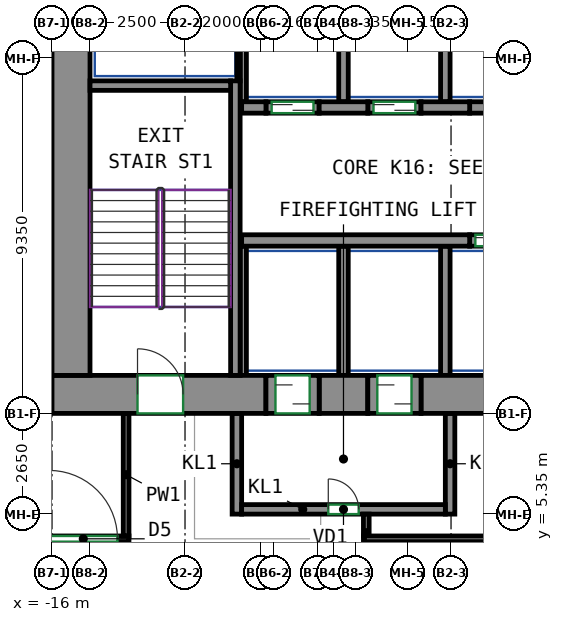
"""IFC4 building model, lengths in metres.
Left out: names, types, materials, properties, quantities, classifications, styles, units other than length and angle.
Written with IfcOpenShell. Run it as: python <this file> out.ifc"""

import sys

from ifc_helpers import new_model, si_unit, direction, frame, frame_2d, origin, place, context, subcontext, project, spatial, rectangle, extrude, source, transform, mapped, element, fill, save


model = new_model("IFC4")
c1 = context("Model", 3, precision=1e-05, world=origin(), true_north=direction((0.0, 1.0)))
c2 = subcontext(c1, "Body", "Model", "MODEL_VIEW")
j1 = project(units=[si_unit("LENGTHUNIT", "METRE"), si_unit("PLANEANGLEUNIT", "RADIAN")], contexts=[c1])
p1 = place(None, origin())
s1 = spatial("IfcSite", under=j1, at=p1, CompositionType="ELEMENT")
p2 = place(p1, origin())
s2 = spatial("IfcBuilding", under=s1, at=p2, CompositionType="ELEMENT")
p3 = place(p2, frame((0.0, 0.0, 67.2)))
s3 = spatial("IfcBuildingStorey", under=s2, at=p3, CompositionType="ELEMENT", Elevation=67.2)
m1 = source(origin(), c2, "Body", "SweptSolid", [
    extrude(rectangle(XDim=5.63, YDim=1.0, at=frame_2d((2.815, 0.0))), origin(), (0.0, 0.0, 1.0), 3.72),
])
p4 = place(p3, frame((-16.0, 8.5, 0.0), z_axis=(0.0, 0.0, 1.0), x_axis=(1.0, 0.0, 0.0)))
e1 = element("IfcWall", 1, at=p4, inside=s3, PredefinedType="SHEAR", context=c2, shape_type="MappedRepresentation", body=[
    mapped(m1, transform((0.0, 0.0, 0.0))),
])
p5 = place(p4, frame((2.25, 0.0, 0.0)))
e2 = element("IfcOpeningElement", 2, at=p5, cuts=e1, PredefinedType="OPENING", context=c2, shape_type="SweptSolid", body=[
    extrude(rectangle(XDim=1.2, YDim=2.1, at=frame_2d((0.6, 1.05))), frame((0.0, 0.51, 0.0), z_axis=(0.0, -1.0, 0.0), x_axis=(1.0, 0.0, 0.0)), (0.0, 0.0, 1.0), 1.02),
])
m2 = source(origin(), c2, "Body", "SweptSolid", [
    extrude(rectangle(XDim=1.28, YDim=1.0, at=frame_2d((0.64, 0.0))), origin(), (0.0, 0.0, 1.0), 3.72),
])
p6 = place(p3, frame((-8.97, 8.5, 0.0), z_axis=(0.0, 0.0, 1.0), x_axis=(1.0, 0.0, 0.0)))
e3 = element("IfcWall", 3, at=p6, inside=s3, PredefinedType="SHEAR", context=c2, shape_type="MappedRepresentation", body=[
    mapped(m2, transform((0.0, 0.0, 0.0))),
])
m3 = source(origin(), c2, "Body", "SweptSolid", [
    extrude(rectangle(XDim=14.18, YDim=1.0, at=frame_2d((7.09, 0.0))), origin(), (0.0, 0.0, 1.0), 3.72),
])
p7 = place(p3, frame((-6.29, 8.5, 0.0), z_axis=(0.0, 0.0, 1.0), x_axis=(1.0, 0.0, 0.0)))
e4 = element("IfcWall", 4, at=p7, inside=s3, PredefinedType="SHEAR", context=c2, shape_type="MappedRepresentation", body=[
    mapped(m3, transform((0.0, 0.0, 0.0))),
])
m4 = source(origin(), c2, "Body", "SweptSolid", [
    extrude(rectangle(XDim=12.0, YDim=1.0, at=frame_2d((6.0, 0.0))), origin(), (0.0, 0.0, 1.0), 3.72),
])
p8 = place(p3, frame((-15.5, 9.0, 0.0), z_axis=(0.0, 0.0, 1.0), x_axis=(0.0, 1.0, 0.0)))
e5 = element("IfcWall", 5, at=p8, inside=s3, PredefinedType="SHEAR", context=c2, shape_type="MappedRepresentation", body=[
    mapped(m4, transform((0.0, 0.0, 0.0))),
])
m5 = source(origin(), c2, "Body", "SweptSolid", [
    extrude(rectangle(XDim=7.75, YDim=0.25, at=frame_2d((3.875, 0.0))), origin(), (0.0, 0.0, 1.0), 3.72),
])
p9 = place(p3, frame((-11.175, 9.0, 0.0), z_axis=(0.0, 0.0, 1.0), x_axis=(0.0, 1.0, 0.0)))
e6 = element("IfcWall", 6, at=p9, inside=s3, PredefinedType="SHEAR", context=c2, shape_type="MappedRepresentation", body=[
    mapped(m5, transform((0.0, 0.0, 0.0))),
])
m6 = source(origin(), c2, "Body", "SweptSolid", [
    extrude(rectangle(XDim=3.7, YDim=0.25, at=frame_2d((1.85, 0.0))), origin(), (0.0, 0.0, 1.0), 3.72),
])
p10 = place(p3, frame((-15.0, 16.625, 0.0), z_axis=(0.0, 0.0, 1.0), x_axis=(1.0, 0.0, 0.0)))
e7 = element("IfcWall", 7, at=p10, inside=s3, PredefinedType="SHEAR", context=c2, shape_type="MappedRepresentation", body=[
    mapped(m6, transform((0.0, 0.0, 0.0))),
])
m7 = source(origin(), c2, "Body", "SweptSolid", [
    extrude(rectangle(XDim=6.0, YDim=0.3, at=frame_2d((3.0, 0.0))), origin(), (0.0, 0.0, 1.0), 3.72),
])
p11 = place(p3, frame((-11.01, 12.55, 0.0), z_axis=(0.0, 0.0, 1.0), x_axis=(1.0, 0.0, 0.0)))
e8 = element("IfcWall", 8, at=p11, inside=s3, PredefinedType="SHEAR", context=c2, shape_type="MappedRepresentation", body=[
    mapped(m7, transform((0.0, 0.0, 0.0))),
])
m8 = source(origin(), c2, "Body", "SweptSolid", [
    extrude(rectangle(XDim=0.64, YDim=0.3, at=frame_2d((0.32, 0.0))), origin(), (0.0, 0.0, 1.0), 3.72),
])
p12 = place(p3, frame((-11.01, 16.05, 0.0), z_axis=(0.0, 0.0, 1.0), x_axis=(1.0, 0.0, 0.0)))
e9 = element("IfcWall", 9, at=p12, inside=s3, PredefinedType="SHEAR", context=c2, shape_type="MappedRepresentation", body=[
    mapped(m8, transform((0.0, 0.0, 0.0))),
])
m9 = source(origin(), c2, "Body", "SweptSolid", [
    extrude(rectangle(XDim=1.28, YDim=0.3, at=frame_2d((0.64, 0.0))), origin(), (0.0, 0.0, 1.0), 3.72),
])
for number, where, z_axis, x_axis in (
    (10, (-8.97, 16.05, 0.0), (0.0, 0.0, 1.0), (1.0, 0.0, 0.0)),
    (11, (-6.29, 16.05, 0.0), (0.0, 0.0, 1.0), (1.0, 0.0, 0.0)),
):
    element("IfcWall", number, at=place(p3, frame(where, z_axis=z_axis, x_axis=x_axis)), inside=s3, PredefinedType="SHEAR", context=c2, shape_type="MappedRepresentation", body=[
        mapped(m9, transform((0.0, 0.0, 0.0))),
    ])
m10 = source(origin(), c2, "Body", "SweptSolid", [
    extrude(rectangle(XDim=1.4, YDim=0.3, at=frame_2d((0.7, 0.0))), origin(), (0.0, 0.0, 1.0), 3.72),
])
p13 = place(p3, frame((-5.01, 12.55, 0.0), z_axis=(0.0, 0.0, 1.0), x_axis=(1.0, 0.0, 0.0)))
e12 = element("IfcWall", 12, at=p13, inside=s3, PredefinedType="PARTITIONING", context=c2, shape_type="MappedRepresentation", body=[
    mapped(m10, transform((0.0, 0.0, 0.0))),
])
p14 = place(p13, frame((0.15, 0.0, 0.0)))
e13 = element("IfcOpeningElement", 13, at=p14, cuts=e12, PredefinedType="OPENING", context=c2, shape_type="SweptSolid", body=[
    extrude(rectangle(XDim=1.1, YDim=2.1, at=frame_2d((0.55, 1.05))), frame((0.0, 0.16, 0.0), z_axis=(0.0, -1.0, 0.0), x_axis=(1.0, 0.0, 0.0)), (0.0, 0.0, 1.0), 0.32),
])
m11 = source(origin(), c2, "Body", "SweptSolid", [
    extrude(rectangle(XDim=1.4, YDim=0.3, at=frame_2d((0.7, 0.0))), origin(), (0.0, 0.0, 1.0), 3.72),
])
p15 = place(p3, frame((-10.37, 16.05, 0.0), z_axis=(0.0, 0.0, 1.0), x_axis=(1.0, 0.0, 0.0)))
e14 = element("IfcWall", 14, at=p15, inside=s3, PredefinedType="PARTITIONING", context=c2, shape_type="MappedRepresentation", body=[
    mapped(m11, transform((0.0, 0.0, 0.0))),
])
p16 = place(p15, frame((0.15, 0.0, 0.0)))
e15 = element("IfcOpeningElement", 15, at=p16, cuts=e14, PredefinedType="OPENING", context=c2, shape_type="SweptSolid", body=[
    extrude(rectangle(XDim=1.1, YDim=2.1, at=frame_2d((0.55, 1.05))), frame((0.0, 0.16, 0.0), z_axis=(0.0, -1.0, 0.0), x_axis=(1.0, 0.0, 0.0)), (0.0, 0.0, 1.0), 0.32),
])
p17 = place(p3, frame((-7.69, 16.05, 0.0), z_axis=(0.0, 0.0, 1.0), x_axis=(1.0, 0.0, 0.0)))
e16 = element("IfcWall", 16, at=p17, inside=s3, PredefinedType="PARTITIONING", context=c2, shape_type="MappedRepresentation", body=[
    mapped(m10, transform((0.0, 0.0, 0.0))),
])
p18 = place(p17, frame((0.15, 0.0, 0.0)))
e17 = element("IfcOpeningElement", 17, at=p18, cuts=e16, PredefinedType="OPENING", context=c2, shape_type="SweptSolid", body=[
    extrude(rectangle(XDim=1.1, YDim=2.1, at=frame_2d((0.55, 1.05))), frame((0.0, 0.16, 0.0), z_axis=(0.0, -1.0, 0.0), x_axis=(1.0, 0.0, 0.0)), (0.0, 0.0, 1.0), 0.32),
])
p19 = place(p3, frame((-5.01, 16.05, 0.0), z_axis=(0.0, 0.0, 1.0), x_axis=(1.0, 0.0, 0.0)))
e18 = element("IfcWall", 18, at=p19, inside=s3, PredefinedType="PARTITIONING", context=c2, shape_type="MappedRepresentation", body=[
    mapped(m10, transform((0.0, 0.0, 0.0))),
])
m12 = source(origin(), c2, "Body", "SweptSolid", [
    extrude(rectangle(XDim=2.65, YDim=0.25, at=frame_2d((1.325, 0.0))), origin(), (0.0, 0.0, 1.0), 3.72),
])
for number, where, z_axis, x_axis in (
    (19, (-11.135, 5.35, 0.0), (0.0, 0.0, 1.0), (0.0, 1.0, 0.0)),
    (20, (-5.525, 5.35, 0.0), (0.0, 0.0, 1.0), (0.0, 1.0, 0.0)),
):
    element("IfcWall", number, at=place(p3, frame(where, z_axis=z_axis, x_axis=x_axis)), inside=s3, PredefinedType="PARTITIONING", context=c2, shape_type="MappedRepresentation", body=[
        mapped(m12, transform((0.0, 0.0, 0.0))),
    ])
m13 = source(origin(), c2, "Body", "SweptSolid", [
    extrude(rectangle(XDim=5.36, YDim=0.25, at=frame_2d((2.68, 0.0))), origin(), (0.0, 0.0, 1.0), 3.72),
])
p20 = place(p3, frame((-11.01, 5.475, 0.0), z_axis=(0.0, 0.0, 1.0), x_axis=(1.0, 0.0, 0.0)))
e21 = element("IfcWall", 21, at=p20, inside=s3, PredefinedType="PARTITIONING", context=c2, shape_type="MappedRepresentation", body=[
    mapped(m13, transform((0.0, 0.0, 0.0))),
])
p21 = place(p20, frame((2.28, 0.0, 0.0)))
e22 = element("IfcOpeningElement", 22, at=p21, cuts=e21, PredefinedType="OPENING", context=c2, shape_type="SweptSolid", body=[
    extrude(rectangle(XDim=0.8, YDim=2.0, at=frame_2d((0.4, 1.0))), frame((0.0, 0.135, 0.0), z_axis=(0.0, -1.0, 0.0), x_axis=(1.0, 0.0, 0.0)), (0.0, 0.0, 1.0), 0.27),
])
m14 = source(origin(), c2, "Body", "SweptSolid", [
    extrude(rectangle(XDim=3.275, YDim=0.165, at=frame_2d((1.638, 0.0))), origin(), (0.0, 0.0, 1.0), 3.72),
])
p22 = place(p3, frame((-10.968, 16.2, 0.0), z_axis=(0.0, 0.0, 1.0), x_axis=(0.0, 1.0, 0.0)))
e23 = element("IfcWall", 23, at=p22, inside=s3, PredefinedType="PARTITIONING", context=c2, shape_type="MappedRepresentation", body=[
    mapped(m14, transform((0.0, 0.0, 0.0))),
])
m15 = source(origin(), c2, "Body", "SweptSolid", [
    extrude(rectangle(XDim=2.725, YDim=0.085, at=frame_2d((1.363, 0.0))), origin(), (0.0, 0.0, 1.0), 3.72),
])
p23 = place(p3, frame((-11.093, 16.75, 0.0), z_axis=(0.0, 0.0, 1.0), x_axis=(0.0, 1.0, 0.0)))
e24 = element("IfcWall", 24, at=p23, inside=s3, PredefinedType="PARTITIONING", context=c2, shape_type="MappedRepresentation", body=[
    mapped(m15, transform((0.0, 0.0, 0.0))),
])
m16 = source(origin(), c2, "Body", "SweptSolid", [
    extrude(rectangle(XDim=3.275, YDim=0.25, at=frame_2d((1.638, 0.0))), origin(), (0.0, 0.0, 1.0), 3.72),
])
for number, where, z_axis, x_axis in (
    (25, (-5.65, 16.2, 0.0), (0.0, 0.0, 1.0), (0.0, 1.0, 0.0)),
    (26, (-8.33, 16.2, 0.0), (0.0, 0.0, 1.0), (0.0, 1.0, 0.0)),
):
    element("IfcWall", number, at=place(p3, frame(where, z_axis=z_axis, x_axis=x_axis)), inside=s3, PredefinedType="PARTITIONING", context=c2, shape_type="MappedRepresentation", body=[
        mapped(m16, transform((0.0, 0.0, 0.0))),
    ])
m17 = source(origin(), c2, "Body", "SweptSolid", [
    extrude(rectangle(XDim=3.4, YDim=0.165, at=frame_2d((1.7, 0.0))), origin(), (0.0, 0.0, 1.0), 3.72),
])
p24 = place(p3, frame((-10.968, 9.0, 0.0), z_axis=(0.0, 0.0, 1.0), x_axis=(0.0, 1.0, 0.0)))
e27 = element("IfcWall", 27, at=p24, inside=s3, PredefinedType="PARTITIONING", context=c2, shape_type="MappedRepresentation", body=[
    mapped(m17, transform((0.0, 0.0, 0.0))),
])
m18 = source(origin(), c2, "Body", "SweptSolid", [
    extrude(rectangle(XDim=3.4, YDim=0.25, at=frame_2d((1.7, 0.0))), origin(), (0.0, 0.0, 1.0), 3.72),
])
for number, where, z_axis, x_axis in (
    (28, (-5.65, 9.0, 0.0), (0.0, 0.0, 1.0), (0.0, 1.0, 0.0)),
    (29, (-8.33, 9.0, 0.0), (0.0, 0.0, 1.0), (0.0, 1.0, 0.0)),
):
    element("IfcWall", number, at=place(p3, frame(where, z_axis=z_axis, x_axis=x_axis)), inside=s3, PredefinedType="PARTITIONING", context=c2, shape_type="MappedRepresentation", body=[
        mapped(m18, transform((0.0, 0.0, 0.0))),
    ])
m19 = source(origin(), c2, "Body", "SweptSolid", [
    extrude(rectangle(XDim=1.4, YDim=1.0, at=frame_2d((0.7, 0.0))), origin(), (0.0, 0.0, 1.0), 2.7),
])
p25 = place(p3, frame((-10.37, 8.5, 0.0), z_axis=(0.0, 0.0, 1.0), x_axis=(1.0, 0.0, 0.0)))
e30 = element("IfcWall", 30, at=p25, inside=s3, PredefinedType="PARTITIONING", context=c2, shape_type="MappedRepresentation", body=[
    mapped(m19, transform((0.0, 0.0, 0.0))),
])
p26 = place(p25, frame((0.25, 0.0, 0.0)))
e31 = element("IfcOpeningElement", 31, at=p26, cuts=e30, PredefinedType="OPENING", context=c2, shape_type="SweptSolid", body=[
    extrude(rectangle(XDim=0.9, YDim=2.1, at=frame_2d((0.45, 1.05))), frame((0.0, 0.51, 0.0), z_axis=(0.0, -1.0, 0.0), x_axis=(1.0, 0.0, 0.0)), (0.0, 0.0, 1.0), 1.02),
])
m20 = source(origin(), c2, "Body", "SweptSolid", [
    extrude(rectangle(XDim=1.4, YDim=1.0, at=frame_2d((0.7, 0.0))), origin(), (0.0, 0.0, 1.0), 2.7),
])
p27 = place(p3, frame((-7.69, 8.5, 0.0), z_axis=(0.0, 0.0, 1.0), x_axis=(1.0, 0.0, 0.0)))
e32 = element("IfcWall", 32, at=p27, inside=s3, PredefinedType="PARTITIONING", context=c2, shape_type="MappedRepresentation", body=[
    mapped(m20, transform((0.0, 0.0, 0.0))),
])
p28 = place(p27, frame((0.25, 0.0, 0.0)))
e33 = element("IfcOpeningElement", 33, at=p28, cuts=e32, PredefinedType="OPENING", context=c2, shape_type="SweptSolid", body=[
    extrude(rectangle(XDim=0.9, YDim=2.1, at=frame_2d((0.45, 1.05))), frame((0.0, 0.51, 0.0), z_axis=(0.0, -1.0, 0.0), x_axis=(1.0, 0.0, 0.0)), (0.0, 0.0, 1.0), 1.02),
])
p29 = place(p3, frame((-19.325, 4.7, 0.0), z_axis=(0.0, 0.0, 1.0), x_axis=(1.0, 0.0, 0.0)))
e34 = element("IfcWall", 34, at=p29, inside=s3, PredefinedType="PARTITIONING", context=c2, shape_type="SweptSolid", body=[
    extrude(rectangle(XDim=5.35, YDim=0.15, at=frame_2d((2.675, 0.0))), origin(), (0.0, 0.0, 1.0), 3.72),
])
p30 = place(p29, frame((3.248, 0.0, 0.0)))
e35 = element("IfcOpeningElement", 35, at=p30, cuts=e34, PredefinedType="OPENING", context=c2, shape_type="SweptSolid", body=[
    extrude(rectangle(XDim=1.8, YDim=2.1, at=frame_2d((0.9, 1.05))), frame((0.0, 0.085, 0.0), z_axis=(0.0, -1.0, 0.0), x_axis=(1.0, 0.0, 0.0)), (0.0, 0.0, 1.0), 0.17),
])
p31 = place(p3, frame((-14.05, 8.0, 0.0), z_axis=(0.0, 0.0, 1.0), x_axis=(0.0, -1.0, 0.0)))
e36 = element("IfcWall", 36, at=p31, inside=s3, PredefinedType="PARTITIONING", context=c2, shape_type="SweptSolid", body=[
    extrude(rectangle(XDim=3.225, YDim=0.15, at=frame_2d((1.613, 0.0))), origin(), (0.0, 0.0, 1.0), 3.72),
])
p32 = place(p3, frame((-7.73, 4.775, 0.0), z_axis=(0.0, 0.0, 1.0), x_axis=(0.0, 1.0, 0.0)))
e37 = element("IfcWall", 37, at=p32, inside=s3, PredefinedType="PARTITIONING", context=c2, shape_type="SweptSolid", body=[
    extrude(rectangle(XDim=0.575, YDim=0.15, at=frame_2d((0.288, 0.0))), origin(), (0.0, 0.0, 1.0), 3.72),
])
p33 = place(p3, frame((-7.805, 4.7, 0.0), z_axis=(0.0, 0.0, 1.0), x_axis=(1.0, 0.0, 0.0)))
e38 = element("IfcWall", 38, at=p33, inside=s3, PredefinedType="PARTITIONING", context=c2, shape_type="SweptSolid", body=[
    extrude(rectangle(XDim=15.97, YDim=0.15, at=frame_2d((7.985, 0.0))), origin(), (0.0, 0.0, 1.0), 3.72),
])
p34 = place(p33, frame((6.43, 0.0, 0.0)))
e39 = element("IfcOpeningElement", 39, at=p34, cuts=e38, PredefinedType="OPENING", context=c2, shape_type="SweptSolid", body=[
    extrude(rectangle(XDim=1.0, YDim=2.1, at=frame_2d((0.5, 1.05))), frame((0.0, 0.085, 0.0), z_axis=(0.0, -1.0, 0.0), x_axis=(1.0, 0.0, 0.0)), (0.0, 0.0, 1.0), 0.17),
])
p35 = place(p21, origin())
e40 = element("IfcDoor", 40, at=p35, inside=s3, OperationType="SINGLE_SWING_LEFT", PredefinedType="DOOR", context=c2, shape_type="SweptSolid", body=[
    extrude(rectangle(XDim=0.8, YDim=2.0, at=frame_2d((0.4, 1.0))), frame((0.0, 0.025, 0.0), z_axis=(0.0, -1.0, 0.0), x_axis=(1.0, 0.0, 0.0)), (0.0, 0.0, 1.0), 0.05),
])
fill(e22, e40)
p36 = place(p26, origin())
e41 = element("IfcDoor", 41, at=p36, inside=s3, OperationType="SLIDING_TO_LEFT", PredefinedType="DOOR", context=c2, shape_type="SweptSolid", body=[
    extrude(rectangle(XDim=0.9, YDim=2.1, at=frame_2d((0.45, 1.05))), frame((0.0, 0.405, 0.0), z_axis=(0.0, -1.0, 0.0), x_axis=(1.0, 0.0, 0.0)), (0.0, 0.0, 1.0), 0.05),
])
fill(e31, e41)
p37 = place(p28, origin())
e42 = element("IfcDoor", 42, at=p37, inside=s3, OperationType="SLIDING_TO_RIGHT", PredefinedType="DOOR", context=c2, shape_type="SweptSolid", body=[
    extrude(rectangle(XDim=0.9, YDim=2.1, at=frame_2d((0.45, 1.05))), frame((0.0, 0.405, 0.0), z_axis=(0.0, -1.0, 0.0), x_axis=(1.0, 0.0, 0.0)), (0.0, 0.0, 1.0), 0.05),
])
fill(e33, e42)
p38 = place(p14, origin())
e43 = element("IfcDoor", 43, at=p38, inside=s3, OperationType="DOUBLE_DOOR_SLIDING", PredefinedType="DOOR", context=c2, shape_type="SweptSolid", body=[
    extrude(rectangle(XDim=1.1, YDim=2.1, at=frame_2d((0.55, 1.05))), frame((0.0, 0.025, 0.0), z_axis=(0.0, -1.0, 0.0), x_axis=(1.0, 0.0, 0.0)), (0.0, 0.0, 1.0), 0.05),
])
fill(e13, e43)
p39 = place(p16, origin())
e44 = element("IfcDoor", 44, at=p39, inside=s3, OperationType="DOUBLE_DOOR_SLIDING", PredefinedType="DOOR", context=c2, shape_type="SweptSolid", body=[
    extrude(rectangle(XDim=1.1, YDim=2.1, at=frame_2d((0.55, 1.05))), frame((0.0, 0.025, 0.0), z_axis=(0.0, -1.0, 0.0), x_axis=(1.0, 0.0, 0.0)), (0.0, 0.0, 1.0), 0.05),
])
fill(e15, e44)
p40 = place(p18, origin())
e45 = element("IfcDoor", 45, at=p40, inside=s3, OperationType="DOUBLE_DOOR_SLIDING", PredefinedType="DOOR", context=c2, shape_type="SweptSolid", body=[
    extrude(rectangle(XDim=1.1, YDim=2.1, at=frame_2d((0.55, 1.05))), frame((0.0, 0.025, 0.0), z_axis=(0.0, -1.0, 0.0), x_axis=(1.0, 0.0, 0.0)), (0.0, 0.0, 1.0), 0.05),
])
fill(e17, e45)
p41 = place(p5, origin())
e46 = element("IfcDoor", 46, at=p41, inside=s3, OperationType="DOUBLE_DOOR_SINGLE_SWING", PredefinedType="DOOR", context=c2, shape_type="SweptSolid", body=[
    extrude(rectangle(XDim=1.2, YDim=2.1, at=frame_2d((0.6, 1.05))), frame((0.0, 0.405, 0.0), z_axis=(0.0, -1.0, 0.0), x_axis=(1.0, 0.0, 0.0)), (0.0, 0.0, 1.0), 0.05),
])
fill(e2, e46)
p42 = place(p30, origin())
e47 = element("IfcDoor", 47, at=p42, inside=s3, OperationType="DOUBLE_DOOR_SINGLE_SWING", PredefinedType="DOOR", context=c2, shape_type="SweptSolid", body=[
    extrude(rectangle(XDim=1.8, YDim=2.1, at=frame_2d((0.9, 1.05))), frame((0.0, 0.025, 0.0), z_axis=(0.0, -1.0, 0.0), x_axis=(1.0, 0.0, 0.0)), (0.0, 0.0, 1.0), 0.05),
])
fill(e35, e47)
save(model, sys.argv[1])
